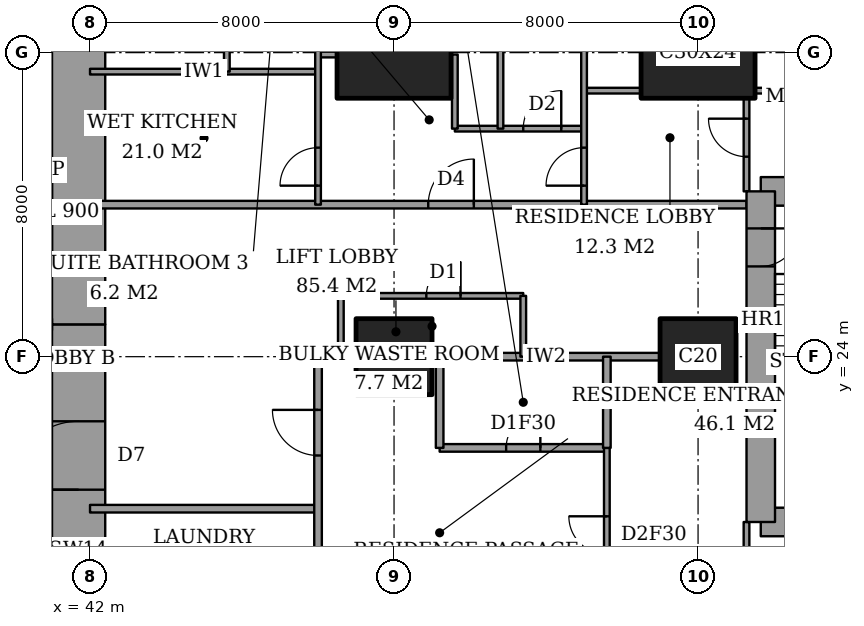
"""IFC4 building model, lengths in metres.
Left out: names, types, materials, properties, quantities, classifications, styles, units other than length and angle.
Written with IfcOpenShell. Run it as: python <this file> out.ifc"""

import sys

from ifc_helpers import new_model, si_unit, direction, frame, frame_2d, origin, origin_2d, place, context, subcontext, project, spatial, rectangle, extrude, element, fill, save


model = new_model("IFC4")
c1 = context("Model", 3, precision=1e-05, world=origin(), true_north=direction((0.0, 1.0)))
c2 = subcontext(c1, "Body", "Model", "MODEL_VIEW")
j1 = project(units=[si_unit("LENGTHUNIT", "METRE"), si_unit("PLANEANGLEUNIT", "RADIAN")], contexts=[c1])
p1 = place(None, origin())
s1 = spatial("IfcSite", under=j1, at=p1, CompositionType="ELEMENT")
p2 = place(p1, origin())
s2 = spatial("IfcBuilding", under=s1, at=p2, CompositionType="ELEMENT")
p3 = place(p2, frame((0.0, 0.0, 121.4)))
s3 = spatial("IfcBuildingStorey", under=s2, at=p3, CompositionType="ELEMENT", Elevation=121.4)
p4 = place(p3, frame((50.0, 24.0, 0.0), z_axis=(0.0, 0.0, 1.0), x_axis=(1.0, 0.0, 0.0)))
e1 = element("IfcColumn", 1, at=p4, inside=s3, PredefinedType="COLUMN", context=c2, shape_type="SweptSolid", body=[
    extrude(rectangle(XDim=2.0, YDim=2.0, at=origin_2d()), origin(), (0.0, 0.0, 1.0), 3.6),
])
p5 = place(p3, frame((50.0, 32.0, 0.0), z_axis=(0.0, 0.0, 1.0), x_axis=(1.0, 0.0, 0.0)))
e2 = element("IfcColumn", 2, at=p5, inside=s3, PredefinedType="COLUMN", context=c2, shape_type="SweptSolid", body=[
    extrude(rectangle(XDim=3.0, YDim=2.4, at=origin_2d()), origin(), (0.0, 0.0, 1.0), 3.6),
])
p6 = place(p3, frame((58.0, 24.0, 0.0), z_axis=(0.0, 0.0, 1.0), x_axis=(1.0, 0.0, 0.0)))
e3 = element("IfcColumn", 3, at=p6, inside=s3, PredefinedType="COLUMN", context=c2, shape_type="SweptSolid", body=[
    extrude(rectangle(XDim=2.0, YDim=2.0, at=origin_2d()), origin(), (0.0, 0.0, 1.0), 3.6),
])
p7 = place(p3, frame((58.0, 32.0, 0.0), z_axis=(0.0, 0.0, 1.0), x_axis=(1.0, 0.0, 0.0)))
e4 = element("IfcColumn", 4, at=p7, inside=s3, PredefinedType="COLUMN", context=c2, shape_type="SweptSolid", body=[
    extrude(rectangle(XDim=3.0, YDim=2.4, at=origin_2d()), origin(), (0.0, 0.0, 1.0), 3.6),
])
p8 = place(p3, frame((41.7, 13.0, 0.0), z_axis=(0.0, 0.0, 1.0), x_axis=(0.0, 1.0, 0.0)))
e5 = element("IfcWall", 5, at=p8, inside=s3, PredefinedType="SHEAR", context=c2, shape_type="SweptSolid", body=[
    extrude(rectangle(XDim=11.85, YDim=1.4, at=frame_2d((5.925, 0.0))), origin(), (0.0, 0.0, 1.0), 3.6),
])
p9 = place(p8, frame((7.5, 0.0, 0.0)))
e6 = element("IfcOpeningElement", 6, at=p9, cuts=e5, PredefinedType="OPENING", context=c2, shape_type="SweptSolid", body=[
    extrude(rectangle(XDim=1.8, YDim=2.4, at=frame_2d((0.9, 1.2))), frame((0.0, 0.71, 0.0), z_axis=(0.0, -1.0, 0.0), x_axis=(1.0, 0.0, 0.0)), (0.0, 0.0, 1.0), 1.42),
])
p10 = place(p3, frame((41.7, 24.85, 0.0), z_axis=(0.0, 0.0, 1.0), x_axis=(0.0, 1.0, 0.0)))
e7 = element("IfcWall", 7, at=p10, inside=s3, PredefinedType="SHEAR", context=c2, shape_type="SweptSolid", body=[
    extrude(rectangle(XDim=10.15, YDim=1.4, at=frame_2d((5.075, 0.0))), origin(), (0.0, 0.0, 1.0), 3.6),
])
for number, where, z_axis, x_axis in (
    (8, (59.65, 19.65, 0.0), (0.0, 0.0, 1.0), (1.0, 0.0, 0.0)),
    (9, (64.1, 28.35, 0.0), (0.0, 0.0, 1.0), (-1.0, 0.0, 0.0)),
):
    element("IfcWall", number, at=place(p3, frame(where, z_axis=z_axis, x_axis=x_axis)), inside=s3, PredefinedType="SHEAR", context=c2, shape_type="SweptSolid", body=[
        extrude(rectangle(XDim=4.45, YDim=0.75, at=frame_2d((2.225, 0.0))), origin(), (0.0, 0.0, 1.0), 3.6),
    ])
p11 = place(p3, frame((59.65, 28.35, 0.0), z_axis=(0.0, 0.0, 1.0), x_axis=(0.0, -1.0, 0.0)))
e10 = element("IfcWall", 10, at=p11, inside=s3, PredefinedType="SHEAR", context=c2, shape_type="SweptSolid", body=[
    extrude(rectangle(XDim=8.7, YDim=0.75, at=frame_2d((4.35, 0.0))), origin(), (0.0, 0.0, 1.0), 3.6),
])
p12 = place(p11, frame((0.975, 0.0, 0.0)))
e11 = element("IfcOpeningElement", 11, at=p12, cuts=e10, PredefinedType="OPENING", context=c2, shape_type="SweptSolid", body=[
    extrude(rectangle(XDim=1.0, YDim=2.1, at=frame_2d((0.5, 1.05))), frame((0.0, 0.385, 0.0), z_axis=(0.0, -1.0, 0.0), x_axis=(1.0, 0.0, 0.0)), (0.0, 0.0, 1.0), 0.77),
])
p13 = place(p3, frame((42.0, 20.0, 0.0), z_axis=(0.0, 0.0, 1.0), x_axis=(1.0, 0.0, 0.0)))
e12 = element("IfcWall", 12, at=p13, inside=s3, PredefinedType="PARTITIONING", context=c2, shape_type="SweptSolid", body=[
    extrude(rectangle(XDim=6.0, YDim=0.2, at=frame_2d((3.0, 0.0))), origin(), (0.0, 0.0, 1.0), 3.35),
])
p14 = place(p3, frame((51.2, 21.6, 0.0), z_axis=(0.0, 0.0, 1.0), x_axis=(1.0, 0.0, 0.0)))
e13 = element("IfcWall", 13, at=p14, inside=s3, PredefinedType="PARTITIONING", context=c2, shape_type="SweptSolid", body=[
    extrude(rectangle(XDim=4.4, YDim=0.2, at=frame_2d((2.2, 0.0))), origin(), (0.0, 0.0, 1.0), 3.35),
])
p15 = place(p14, frame((1.75, 0.0, 0.0)))
e14 = element("IfcOpeningElement", 14, at=p15, cuts=e13, PredefinedType="OPENING", context=c2, shape_type="SweptSolid", body=[
    extrude(rectangle(XDim=0.9, YDim=2.1, at=frame_2d((0.45, 1.05))), frame((0.0, 0.11, 0.0), z_axis=(0.0, -1.0, 0.0), x_axis=(1.0, 0.0, 0.0)), (0.0, 0.0, 1.0), 0.22),
])
p16 = place(p3, frame((48.0, 24.0, 0.0), z_axis=(0.0, 0.0, 1.0), x_axis=(1.0, 0.0, 0.0)))
e15 = element("IfcWall", 15, at=p16, inside=s3, PredefinedType="PARTITIONING", context=c2, shape_type="SweptSolid", body=[
    extrude(rectangle(XDim=1.0, YDim=0.2, at=frame_2d((0.5, 0.0))), origin(), (0.0, 0.0, 1.0), 3.35),
])
p17 = place(p3, frame((51.0, 24.0, 0.0), z_axis=(0.0, 0.0, 1.0), x_axis=(1.0, 0.0, 0.0)))
e16 = element("IfcWall", 16, at=p17, inside=s3, PredefinedType="PARTITIONING", context=c2, shape_type="SweptSolid", body=[
    extrude(rectangle(XDim=6.0, YDim=0.2, at=frame_2d((3.0, 0.0))), origin(), (0.0, 0.0, 1.0), 3.35),
])
p18 = place(p3, frame((48.6, 25.6, 0.0), z_axis=(0.0, 0.0, 1.0), x_axis=(1.0, 0.0, 0.0)))
e17 = element("IfcWall", 17, at=p18, inside=s3, PredefinedType="PARTITIONING", context=c2, shape_type="SweptSolid", body=[
    extrude(rectangle(XDim=4.8, YDim=0.15, at=frame_2d((2.4, 0.0))), origin(), (0.0, 0.0, 1.0), 3.35),
])
p19 = place(p18, frame((2.25, 0.0, 0.0)))
e18 = element("IfcOpeningElement", 18, at=p19, cuts=e17, PredefinedType="OPENING", context=c2, shape_type="SweptSolid", body=[
    extrude(rectangle(XDim=0.9, YDim=2.1, at=frame_2d((0.45, 1.05))), frame((0.0, 0.085, 0.0), z_axis=(0.0, -1.0, 0.0), x_axis=(1.0, 0.0, 0.0)), (0.0, 0.0, 1.0), 0.17),
])
p20 = place(p3, frame((42.0, 28.0, 0.0), z_axis=(0.0, 0.0, 1.0), x_axis=(1.0, 0.0, 0.0)))
e19 = element("IfcWall", 19, at=p20, inside=s3, PredefinedType="PARTITIONING", context=c2, shape_type="SweptSolid", body=[
    extrude(rectangle(XDim=17.275, YDim=0.2, at=frame_2d((8.637, 0.0))), origin(), (0.0, 0.0, 1.0), 3.35),
])
p21 = place(p20, frame((8.9, 0.0, 0.0)))
e20 = element("IfcOpeningElement", 20, at=p21, cuts=e19, PredefinedType="OPENING", context=c2, shape_type="SweptSolid", body=[
    extrude(rectangle(XDim=1.2, YDim=2.4, at=frame_2d((0.6, 1.2))), frame((0.0, 0.11, 0.0), z_axis=(0.0, -1.0, 0.0), x_axis=(1.0, 0.0, 0.0)), (0.0, 0.0, 1.0), 0.22),
])
p22 = place(p3, frame((51.6, 30.0, 0.0), z_axis=(0.0, 0.0, 1.0), x_axis=(1.0, 0.0, 0.0)))
e21 = element("IfcWall", 21, at=p22, inside=s3, PredefinedType="PARTITIONING", context=c2, shape_type="SweptSolid", body=[
    extrude(rectangle(XDim=3.4, YDim=0.15, at=frame_2d((1.7, 0.0))), origin(), (0.0, 0.0, 1.0), 3.35),
])
p23 = place(p22, frame((1.8, 0.0, 0.0)))
e22 = element("IfcOpeningElement", 22, at=p23, cuts=e21, PredefinedType="OPENING", context=c2, shape_type="SweptSolid", body=[
    extrude(rectangle(XDim=1.0, YDim=2.1, at=frame_2d((0.5, 1.05))), frame((0.0, 0.085, 0.0), z_axis=(0.0, -1.0, 0.0), x_axis=(1.0, 0.0, 0.0)), (0.0, 0.0, 1.0), 0.17),
])
p24 = place(p3, frame((55.0, 31.0, 0.0), z_axis=(0.0, 0.0, 1.0), x_axis=(1.0, 0.0, 0.0)))
e23 = element("IfcWall", 23, at=p24, inside=s3, PredefinedType="PARTITIONING", context=c2, shape_type="SweptSolid", body=[
    extrude(rectangle(XDim=1.5, YDim=0.15, at=frame_2d((0.75, 0.0))), origin(), (0.0, 0.0, 1.0), 3.35),
])
p25 = place(p3, frame((59.5, 31.0, 0.0), z_axis=(0.0, 0.0, 1.0), x_axis=(1.0, 0.0, 0.0)))
e24 = element("IfcWall", 24, at=p25, inside=s3, PredefinedType="PARTITIONING", context=c2, shape_type="SweptSolid", body=[
    extrude(rectangle(XDim=5.15, YDim=0.15, at=frame_2d((2.575, 0.0))), origin(), (0.0, 0.0, 1.0), 3.35),
])
p26 = place(p3, frame((42.0, 31.5, 0.0), z_axis=(0.0, 0.0, 1.0), x_axis=(1.0, 0.0, 0.0)))
e25 = element("IfcWall", 25, at=p26, inside=s3, PredefinedType="PARTITIONING", context=c2, shape_type="SweptSolid", body=[
    extrude(rectangle(XDim=6.0, YDim=0.15, at=frame_2d((3.0, 0.0))), origin(), (0.0, 0.0, 1.0), 3.35),
])
p27 = place(p3, frame((48.0, 31.95, 0.0), z_axis=(0.0, 0.0, 1.0), x_axis=(1.0, 0.0, 0.0)))
e26 = element("IfcWall", 26, at=p27, inside=s3, PredefinedType="PARTITIONING", context=c2, shape_type="SweptSolid", body=[
    extrude(rectangle(XDim=0.5, YDim=0.15, at=frame_2d((0.25, 0.0))), origin(), (0.0, 0.0, 1.0), 2.634),
])
p28 = place(p3, frame((45.6, 31.5, 0.0), z_axis=(0.0, 0.0, 1.0), x_axis=(0.0, 1.0, 0.0)))
e27 = element("IfcWall", 27, at=p28, inside=s3, PredefinedType="PARTITIONING", context=c2, shape_type="SweptSolid", body=[
    extrude(rectangle(XDim=2.6, YDim=0.15, at=frame_2d((1.3, 0.0))), origin(), (0.0, 0.0, 1.0), 3.35),
])
p29 = place(p28, frame((0.85, 0.0, 0.0)))
e28 = element("IfcOpeningElement", 28, at=p29, cuts=e27, PredefinedType="OPENING", context=c2, shape_type="SweptSolid", body=[
    extrude(rectangle(XDim=0.9, YDim=2.1, at=frame_2d((0.45, 1.05))), frame((0.0, 0.085, 0.0), z_axis=(0.0, -1.0, 0.0), x_axis=(1.0, 0.0, 0.0)), (0.0, 0.0, 1.0), 0.17),
])
p30 = place(p3, frame((48.0, 17.0, 0.0), z_axis=(0.0, 0.0, 1.0), x_axis=(0.0, 1.0, 0.0)))
e29 = element("IfcWall", 29, at=p30, inside=s3, PredefinedType="PARTITIONING", context=c2, shape_type="SweptSolid", body=[
    extrude(rectangle(XDim=7.0, YDim=0.2, at=frame_2d((3.5, 0.0))), origin(), (0.0, 0.0, 1.0), 3.35),
])
p31 = place(p30, frame((4.4, 0.0, 0.0)))
e30 = element("IfcOpeningElement", 30, at=p31, cuts=e29, PredefinedType="OPENING", context=c2, shape_type="SweptSolid", body=[
    extrude(rectangle(XDim=1.2, YDim=2.4, at=frame_2d((0.6, 1.2))), frame((0.0, 0.11, 0.0), z_axis=(0.0, -1.0, 0.0), x_axis=(1.0, 0.0, 0.0)), (0.0, 0.0, 1.0), 0.22),
])
p32 = place(p30, frame((1.05, 0.0, 0.0)))
e31 = element("IfcOpeningElement", 31, at=p32, cuts=e29, PredefinedType="OPENING", context=c2, shape_type="SweptSolid", body=[
    extrude(rectangle(XDim=0.9, YDim=2.1, at=frame_2d((0.45, 1.05))), frame((0.0, 0.11, 0.0), z_axis=(0.0, -1.0, 0.0), x_axis=(1.0, 0.0, 0.0)), (0.0, 0.0, 1.0), 0.22),
])
p33 = place(p3, frame((48.0, 28.0, 0.0), z_axis=(0.0, 0.0, 1.0), x_axis=(0.0, 1.0, 0.0)))
e32 = element("IfcWall", 32, at=p33, inside=s3, PredefinedType="PARTITIONING", context=c2, shape_type="SweptSolid", body=[
    extrude(rectangle(XDim=9.4, YDim=0.15, at=frame_2d((4.7, 0.0))), origin(), (0.0, 0.0, 1.0), 3.35),
])
p34 = place(p33, frame((0.5, 0.0, 0.0)))
e33 = element("IfcOpeningElement", 33, at=p34, cuts=e32, PredefinedType="OPENING", context=c2, shape_type="SweptSolid", body=[
    extrude(rectangle(XDim=1.0, YDim=2.1, at=frame_2d((0.5, 1.05))), frame((0.0, 0.085, 0.0), z_axis=(0.0, -1.0, 0.0), x_axis=(1.0, 0.0, 0.0)), (0.0, 0.0, 1.0), 0.17),
])
p35 = place(p3, frame((48.6, 24.0, 0.0), z_axis=(0.0, 0.0, 1.0), x_axis=(0.0, 1.0, 0.0)))
e34 = element("IfcWall", 34, at=p35, inside=s3, PredefinedType="PARTITIONING", context=c2, shape_type="SweptSolid", body=[
    extrude(rectangle(XDim=1.6, YDim=0.15, at=frame_2d((0.8, 0.0))), origin(), (0.0, 0.0, 1.0), 3.35),
])
p36 = place(p3, frame((51.2, 21.6, 0.0), z_axis=(0.0, 0.0, 1.0), x_axis=(0.0, 1.0, 0.0)))
e35 = element("IfcWall", 35, at=p36, inside=s3, PredefinedType="PARTITIONING", context=c2, shape_type="SweptSolid", body=[
    extrude(rectangle(XDim=2.4, YDim=0.2, at=frame_2d((1.2, 0.0))), origin(), (0.0, 0.0, 1.0), 3.35),
])
p37 = place(p3, frame((51.6, 30.0, 0.0), z_axis=(0.0, 0.0, 1.0), x_axis=(0.0, 1.0, 0.0)))
e36 = element("IfcWall", 36, at=p37, inside=s3, PredefinedType="PARTITIONING", context=c2, shape_type="SweptSolid", body=[
    extrude(rectangle(XDim=1.95, YDim=0.15, at=frame_2d((0.975, 0.0))), origin(), (0.0, 0.0, 1.0), 3.35),
])
p38 = place(p3, frame((52.8, 30.0, 0.0), z_axis=(0.0, 0.0, 1.0), x_axis=(0.0, 1.0, 0.0)))
e37 = element("IfcWall", 37, at=p38, inside=s3, PredefinedType="PARTITIONING", context=c2, shape_type="SweptSolid", body=[
    extrude(rectangle(XDim=7.4, YDim=0.15, at=frame_2d((3.7, 0.0))), origin(), (0.0, 0.0, 1.0), 3.35),
])
p39 = place(p3, frame((53.4, 24.0, 0.0), z_axis=(0.0, 0.0, 1.0), x_axis=(0.0, 1.0, 0.0)))
e38 = element("IfcWall", 38, at=p39, inside=s3, PredefinedType="PARTITIONING", context=c2, shape_type="SweptSolid", body=[
    extrude(rectangle(XDim=1.6, YDim=0.15, at=frame_2d((0.8, 0.0))), origin(), (0.0, 0.0, 1.0), 3.35),
])
p40 = place(p3, frame((55.0, 28.0, 0.0), z_axis=(0.0, 0.0, 1.0), x_axis=(0.0, 1.0, 0.0)))
e39 = element("IfcWall", 39, at=p40, inside=s3, PredefinedType="PARTITIONING", context=c2, shape_type="SweptSolid", body=[
    extrude(rectangle(XDim=9.4, YDim=0.15, at=frame_2d((4.7, 0.0))), origin(), (0.0, 0.0, 1.0), 3.35),
])
p41 = place(p40, frame((0.5, 0.0, 0.0)))
e40 = element("IfcOpeningElement", 40, at=p41, cuts=e39, PredefinedType="OPENING", context=c2, shape_type="SweptSolid", body=[
    extrude(rectangle(XDim=1.0, YDim=2.1, at=frame_2d((0.5, 1.05))), frame((0.0, 0.085, 0.0), z_axis=(0.0, -1.0, 0.0), x_axis=(1.0, 0.0, 0.0)), (0.0, 0.0, 1.0), 0.17),
])
p42 = place(p3, frame((55.6, 21.6, 0.0), z_axis=(0.0, 0.0, 1.0), x_axis=(0.0, 1.0, 0.0)))
e41 = element("IfcWall", 41, at=p42, inside=s3, PredefinedType="PARTITIONING", context=c2, shape_type="SweptSolid", body=[
    extrude(rectangle(XDim=2.4, YDim=0.2, at=frame_2d((1.2, 0.0))), origin(), (0.0, 0.0, 1.0), 3.35),
])
p43 = place(p3, frame((55.6, 11.0, 0.0), z_axis=(0.0, 0.0, 1.0), x_axis=(0.0, 1.0, 0.0)))
e42 = element("IfcWall", 42, at=p43, inside=s3, PredefinedType="PARTITIONING", context=c2, shape_type="SweptSolid", body=[
    extrude(rectangle(XDim=10.6, YDim=0.15, at=frame_2d((5.3, 0.0))), origin(), (0.0, 0.0, 1.0), 3.35),
])
p44 = place(p43, frame((7.8, 0.0, 0.0)))
e43 = element("IfcOpeningElement", 43, at=p44, cuts=e42, PredefinedType="OPENING", context=c2, shape_type="SweptSolid", body=[
    extrude(rectangle(XDim=1.0, YDim=2.1, at=frame_2d((0.5, 1.05))), frame((0.0, 0.085, 0.0), z_axis=(0.0, -1.0, 0.0), x_axis=(1.0, 0.0, 0.0)), (0.0, 0.0, 1.0), 0.17),
])
p45 = place(p3, frame((59.275, 17.2, 0.0), z_axis=(0.0, 0.0, 1.0), x_axis=(0.0, 1.0, 0.0)))
e44 = element("IfcWall", 44, at=p45, inside=s3, PredefinedType="PARTITIONING", context=c2, shape_type="SweptSolid", body=[
    extrude(rectangle(XDim=2.45, YDim=0.15, at=frame_2d((1.225, 0.0))), origin(), (0.0, 0.0, 1.0), 3.35),
])
p46 = place(p45, frame((0.538, 0.0, 0.0)))
e45 = element("IfcOpeningElement", 45, at=p46, cuts=e44, PredefinedType="OPENING", context=c2, shape_type="SweptSolid", body=[
    extrude(rectangle(XDim=1.0, YDim=2.1, at=frame_2d((0.5, 1.05))), frame((0.0, 0.085, 0.0), z_axis=(0.0, -1.0, 0.0), x_axis=(1.0, 0.0, 0.0)), (0.0, 0.0, 1.0), 0.17),
])
p47 = place(p3, frame((59.275, 28.35, 0.0), z_axis=(0.0, 0.0, 1.0), x_axis=(0.0, 1.0, 0.0)))
e46 = element("IfcWall", 46, at=p47, inside=s3, PredefinedType="PARTITIONING", context=c2, shape_type="SweptSolid", body=[
    extrude(rectangle(XDim=2.45, YDim=0.15, at=frame_2d((1.225, 0.0))), origin(), (0.0, 0.0, 1.0), 3.35),
])
p48 = place(p47, frame((0.913, 0.0, 0.0)))
e47 = element("IfcOpeningElement", 47, at=p48, cuts=e46, PredefinedType="OPENING", context=c2, shape_type="SweptSolid", body=[
    extrude(rectangle(XDim=1.0, YDim=2.1, at=frame_2d((0.5, 1.05))), frame((0.0, 0.085, 0.0), z_axis=(0.0, -1.0, 0.0), x_axis=(1.0, 0.0, 0.0)), (0.0, 0.0, 1.0), 0.17),
])
p49 = place(p44, origin())
e48 = element("IfcDoor", 48, at=p49, inside=s3, OperationType="SINGLE_SWING_LEFT", PredefinedType="DOOR", context=c2, shape_type="SweptSolid", body=[
    extrude(rectangle(XDim=1.0, YDim=2.1, at=frame_2d((0.5, 1.05))), frame((0.0, 0.025, 0.0), z_axis=(0.0, -1.0, 0.0), x_axis=(1.0, 0.0, 0.0)), (0.0, 0.0, 1.0), 0.05),
])
fill(e43, e48)
p50 = place(p15, origin())
e49 = element("IfcDoor", 49, at=p50, inside=s3, OperationType="SINGLE_SWING_LEFT", PredefinedType="DOOR", context=c2, shape_type="SweptSolid", body=[
    extrude(rectangle(XDim=0.9, YDim=2.1, at=frame_2d((0.45, 1.05))), frame((0.0, 0.025, 0.0), z_axis=(0.0, -1.0, 0.0), x_axis=(1.0, 0.0, 0.0)), (0.0, 0.0, 1.0), 0.05),
])
fill(e14, e49)
p51 = place(p31, origin())
e50 = element("IfcDoor", 50, at=p51, inside=s3, OperationType="SINGLE_SWING_LEFT", PredefinedType="DOOR", context=c2, shape_type="SweptSolid", body=[
    extrude(rectangle(XDim=1.2, YDim=2.4, at=frame_2d((0.6, 1.2))), frame((0.0, 0.025, 0.0), z_axis=(0.0, -1.0, 0.0), x_axis=(1.0, 0.0, 0.0)), (0.0, 0.0, 1.0), 0.05),
])
fill(e30, e50)
p52 = place(p48, origin())
e51 = element("IfcDoor", 51, at=p52, inside=s3, OperationType="SINGLE_SWING_LEFT", PredefinedType="DOOR", context=c2, shape_type="SweptSolid", body=[
    extrude(rectangle(XDim=1.0, YDim=2.1, at=frame_2d((0.5, 1.05))), frame((0.0, 0.025, 0.0), z_axis=(0.0, -1.0, 0.0), x_axis=(1.0, 0.0, 0.0)), (0.0, 0.0, 1.0), 0.05),
])
fill(e47, e51)
p53 = place(p41, origin())
e52 = element("IfcDoor", 52, at=p53, inside=s3, OperationType="SINGLE_SWING_RIGHT", PredefinedType="DOOR", context=c2, shape_type="SweptSolid", body=[
    extrude(rectangle(XDim=1.0, YDim=2.1, at=frame_2d((0.5, 1.05))), frame((0.0, 0.025, 0.0), z_axis=(0.0, -1.0, 0.0), x_axis=(1.0, 0.0, 0.0)), (0.0, 0.0, 1.0), 0.05),
])
fill(e40, e52)
p54 = place(p21, origin())
e53 = element("IfcDoor", 53, at=p54, inside=s3, OperationType="SINGLE_SWING_LEFT", PredefinedType="DOOR", context=c2, shape_type="SweptSolid", body=[
    extrude(rectangle(XDim=1.2, YDim=2.4, at=frame_2d((0.6, 1.2))), frame((0.0, 0.025, 0.0), z_axis=(0.0, -1.0, 0.0), x_axis=(1.0, 0.0, 0.0)), (0.0, 0.0, 1.0), 0.05),
])
fill(e20, e53)
p55 = place(p23, origin())
e54 = element("IfcDoor", 54, at=p55, inside=s3, OperationType="SINGLE_SWING_LEFT", PredefinedType="DOOR", context=c2, shape_type="SweptSolid", body=[
    extrude(rectangle(XDim=1.0, YDim=2.1, at=frame_2d((0.5, 1.05))), frame((0.0, 0.025, 0.0), z_axis=(0.0, -1.0, 0.0), x_axis=(1.0, 0.0, 0.0)), (0.0, 0.0, 1.0), 0.05),
])
fill(e22, e54)
p56 = place(p34, origin())
e55 = element("IfcDoor", 55, at=p56, inside=s3, OperationType="SINGLE_SWING_RIGHT", PredefinedType="DOOR", context=c2, shape_type="SweptSolid", body=[
    extrude(rectangle(XDim=1.0, YDim=2.1, at=frame_2d((0.5, 1.05))), frame((0.0, 0.025, 0.0), z_axis=(0.0, -1.0, 0.0), x_axis=(1.0, 0.0, 0.0)), (0.0, 0.0, 1.0), 0.05),
])
fill(e33, e55)
p57 = place(p19, origin())
e56 = element("IfcDoor", 56, at=p57, inside=s3, OperationType="SINGLE_SWING_LEFT", PredefinedType="DOOR", context=c2, shape_type="SweptSolid", body=[
    extrude(rectangle(XDim=0.9, YDim=2.1, at=frame_2d((0.45, 1.05))), frame((0.0, 0.025, 0.0), z_axis=(0.0, -1.0, 0.0), x_axis=(1.0, 0.0, 0.0)), (0.0, 0.0, 1.0), 0.05),
])
fill(e18, e56)
p58 = place(p9, origin())
e57 = element("IfcDoor", 57, at=p58, inside=s3, OperationType="DOUBLE_DOOR_DOUBLE_SWING", PredefinedType="DOOR", context=c2, shape_type="SweptSolid", body=[
    extrude(rectangle(XDim=1.8, YDim=2.4, at=frame_2d((0.9, 1.2))), frame((0.0, 0.025, 0.0), z_axis=(0.0, -1.0, 0.0), x_axis=(1.0, 0.0, 0.0)), (0.0, 0.0, 1.0), 0.05),
])
fill(e6, e57)
p59 = place(p12, origin())
e58 = element("IfcDoor", 58, at=p59, inside=s3, OperationType="SINGLE_SWING_RIGHT", PredefinedType="DOOR", context=c2, shape_type="SweptSolid", body=[
    extrude(rectangle(XDim=1.0, YDim=2.1, at=frame_2d((0.5, 1.05))), frame((0.0, 0.025, 0.0), z_axis=(0.0, -1.0, 0.0), x_axis=(1.0, 0.0, 0.0)), (0.0, 0.0, 1.0), 0.05),
])
fill(e11, e58)
save(model, sys.argv[1])
